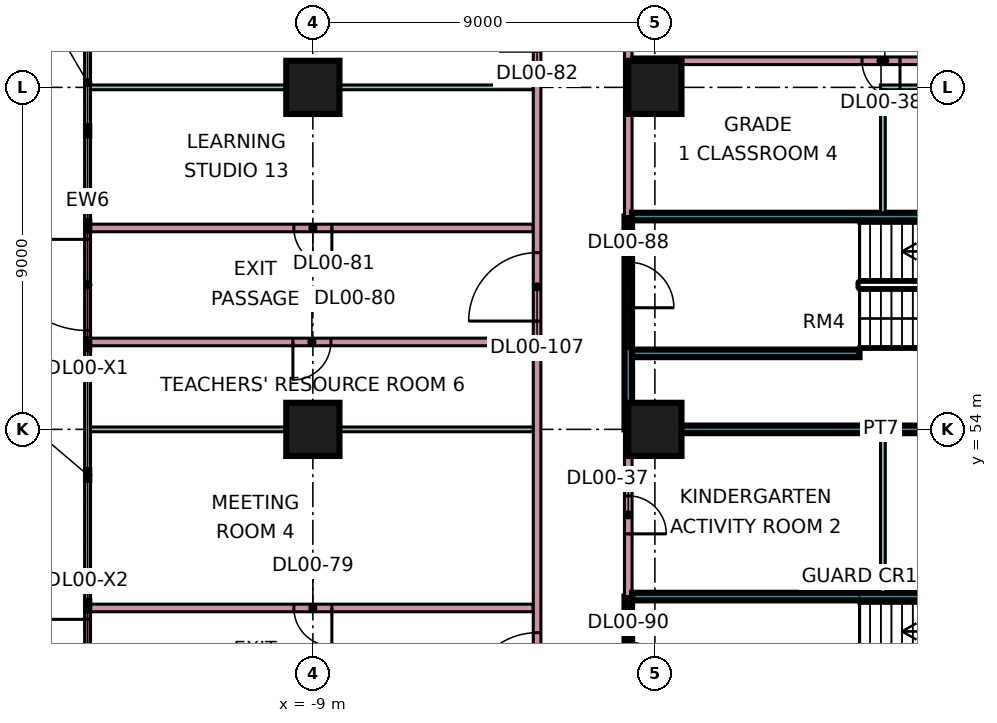
"""IFC4 building model, lengths in metres.
Left out: names, types, materials, properties, quantities, classifications, styles, units other than length and angle.
Written with IfcOpenShell. Run it as: python <this file> out.ifc"""

import sys

from ifc_helpers import new_model, si_unit, direction, frame, frame_2d, origin, origin_2d, place, context, subcontext, project, spatial, rectangle, extrude, element, fill, save


model = new_model("IFC4")
c1 = context("Model", 3, precision=1e-05, world=origin(), true_north=direction((0.0, 1.0)))
c2 = subcontext(c1, "Body", "Model", "MODEL_VIEW")
j1 = project(units=[si_unit("LENGTHUNIT", "METRE"), si_unit("PLANEANGLEUNIT", "RADIAN")], contexts=[c1])
p1 = place(None, origin())
s1 = spatial("IfcSite", under=j1, at=p1, CompositionType="ELEMENT")
p2 = place(p1, origin())
s2 = spatial("IfcBuilding", under=s1, at=p2, CompositionType="ELEMENT")
p3 = place(p2, origin())
s3 = spatial("IfcBuildingStorey", under=s2, at=p3, CompositionType="ELEMENT", Elevation=0.0)
for number, where, z_axis, x_axis in (
    (1, (-9.0, 54.0, 0.0), (0.0, 0.0, 1.0), (1.0, 0.0, 0.0)),
    (2, (0.0, 54.0, 0.0), (0.0, 0.0, 1.0), (1.0, 0.0, 0.0)),
    (3, (-9.0, 63.0, 0.0), (0.0, 0.0, 1.0), (1.0, 0.0, 0.0)),
    (4, (0.0, 63.0, 0.0), (0.0, 0.0, 1.0), (1.0, 0.0, 0.0)),
):
    element("IfcColumn", number, at=place(p3, frame(where, z_axis=z_axis, x_axis=x_axis)), inside=s3, PredefinedType="COLUMN", context=c2, shape_type="SweptSolid", body=[
        extrude(rectangle(XDim=1.4, YDim=1.4, at=origin_2d()), origin(), (0.0, 0.0, 1.0), 7.2),
    ])
p4 = place(p3, frame((-14.925, 59.3, 0.0), z_axis=(0.0, 0.0, 1.0), x_axis=(0.0, -1.0, 0.0)))
e5 = element("IfcWall", 5, at=p4, inside=s3, PredefinedType="SOLIDWALL", context=c2, shape_type="SweptSolid", body=[
    extrude(rectangle(XDim=3.0, YDim=0.15, at=frame_2d((1.5, 0.0))), origin(), (0.0, 0.0, 1.0), 6.8),
])
p5 = place(p4, frame((0.3, 0.0, 0.0)))
e6 = element("IfcOpeningElement", 6, at=p5, cuts=e5, PredefinedType="OPENING", context=c2, shape_type="SweptSolid", body=[
    extrude(rectangle(XDim=2.4, YDim=2.4, at=frame_2d((1.2, 1.2))), frame((0.0, 0.085, 0.0), z_axis=(0.0, -1.0, 0.0), x_axis=(1.0, 0.0, 0.0)), (0.0, 0.0, 1.0), 0.17),
])
p6 = place(p3, frame((-14.925, 49.3, 0.0), z_axis=(0.0, 0.0, 1.0), x_axis=(0.0, -1.0, 0.0)))
e7 = element("IfcWall", 7, at=p6, inside=s3, PredefinedType="SOLIDWALL", context=c2, shape_type="SweptSolid", body=[
    extrude(rectangle(XDim=3.0, YDim=0.15, at=frame_2d((1.5, 0.0))), origin(), (0.0, 0.0, 1.0), 6.8),
])
p7 = place(p6, frame((0.3, 0.0, 0.0)))
e8 = element("IfcOpeningElement", 8, at=p7, cuts=e7, PredefinedType="OPENING", context=c2, shape_type="SweptSolid", body=[
    extrude(rectangle(XDim=2.4, YDim=2.4, at=frame_2d((1.2, 1.2))), frame((0.0, 0.085, 0.0), z_axis=(0.0, -1.0, 0.0), x_axis=(1.0, 0.0, 0.0)), (0.0, 0.0, 1.0), 0.17),
])
p8 = place(p3, frame((-14.925, 49.3, 0.0), z_axis=(0.0, 0.0, 1.0), x_axis=(1.0, 0.0, 0.0)))
e9 = element("IfcWall", 9, at=p8, inside=s3, PredefinedType="PARTITIONING", context=c2, shape_type="SweptSolid", body=[
    extrude(rectangle(XDim=11.725, YDim=0.2, at=frame_2d((5.863, 0.0))), origin(), (0.0, 0.0, 1.0), 6.8),
])
p9 = place(p8, frame((5.425, 0.0, 0.0)))
e10 = element("IfcOpeningElement", 10, at=p9, cuts=e9, PredefinedType="OPENING", context=c2, shape_type="SweptSolid", body=[
    extrude(rectangle(XDim=1.0, YDim=2.1, at=frame_2d((0.5, 1.05))), frame((0.0, 0.11, 0.0), z_axis=(0.0, -1.0, 0.0), x_axis=(1.0, 0.0, 0.0)), (0.0, 0.0, 1.0), 0.22),
])
p10 = place(p3, frame((-14.925, 54.0, 0.0), z_axis=(0.0, 0.0, 1.0), x_axis=(1.0, 0.0, 0.0)))
e11 = element("IfcWall", 11, at=p10, inside=s3, PredefinedType="PARTITIONING", context=c2, shape_type="SweptSolid", body=[
    extrude(rectangle(XDim=11.725, YDim=0.125, at=frame_2d((5.863, 0.0))), origin(), (0.0, 0.0, 1.0), 6.8),
])
p11 = place(p3, frame((-14.925, 56.3, 0.0), z_axis=(0.0, 0.0, 1.0), x_axis=(1.0, 0.0, 0.0)))
e12 = element("IfcWall", 12, at=p11, inside=s3, PredefinedType="PARTITIONING", context=c2, shape_type="SweptSolid", body=[
    extrude(rectangle(XDim=11.725, YDim=0.2, at=frame_2d((5.863, 0.0))), origin(), (0.0, 0.0, 1.0), 6.8),
])
p12 = place(p11, frame((5.4, 0.0, 0.0)))
e13 = element("IfcOpeningElement", 13, at=p12, cuts=e12, PredefinedType="OPENING", context=c2, shape_type="SweptSolid", body=[
    extrude(rectangle(XDim=1.0, YDim=2.1, at=frame_2d((0.5, 1.05))), frame((0.0, 0.11, 0.0), z_axis=(0.0, -1.0, 0.0), x_axis=(1.0, 0.0, 0.0)), (0.0, 0.0, 1.0), 0.22),
])
p13 = place(p3, frame((-14.925, 59.3, 0.0), z_axis=(0.0, 0.0, 1.0), x_axis=(1.0, 0.0, 0.0)))
e14 = element("IfcWall", 14, at=p13, inside=s3, PredefinedType="PARTITIONING", context=c2, shape_type="SweptSolid", body=[
    extrude(rectangle(XDim=11.725, YDim=0.2, at=frame_2d((5.863, 0.0))), origin(), (0.0, 0.0, 1.0), 6.8),
])
p14 = place(p13, frame((5.425, 0.0, 0.0)))
e15 = element("IfcOpeningElement", 15, at=p14, cuts=e14, PredefinedType="OPENING", context=c2, shape_type="SweptSolid", body=[
    extrude(rectangle(XDim=1.0, YDim=2.1, at=frame_2d((0.5, 1.05))), frame((0.0, 0.11, 0.0), z_axis=(0.0, -1.0, 0.0), x_axis=(1.0, 0.0, 0.0)), (0.0, 0.0, 1.0), 0.22),
])
p15 = place(p3, frame((-14.925, 63.0, 0.0), z_axis=(0.0, 0.0, 1.0), x_axis=(1.0, 0.0, 0.0)))
e16 = element("IfcWall", 16, at=p15, inside=s3, PredefinedType="PARTITIONING", context=c2, shape_type="SweptSolid", body=[
    extrude(rectangle(XDim=11.725, YDim=0.125, at=frame_2d((5.863, 0.0))), origin(), (0.0, 0.0, 1.0), 6.8),
])
p16 = place(p3, frame((-3.1, -3.0, 0.0), z_axis=(0.0, 0.0, 1.0), x_axis=(0.0, 1.0, 0.0)))
e17 = element("IfcWall", 17, at=p16, inside=s3, PredefinedType="PARTITIONING", context=c2, shape_type="SweptSolid", body=[
    extrude(rectangle(XDim=69.1, YDim=0.2, at=frame_2d((34.55, 0.0))), origin(), (0.0, 0.0, 1.0), 6.8),
])
p17 = place(p16, frame((8.6, 0.0, 0.0)))
e18 = element("IfcOpeningElement", 18, at=p17, cuts=e17, PredefinedType="OPENING", context=c2, shape_type="SweptSolid", body=[
    extrude(rectangle(XDim=1.0, YDim=2.1, at=frame_2d((0.5, 1.05))), frame((0.0, 0.11, 0.0), z_axis=(0.0, -1.0, 0.0), x_axis=(1.0, 0.0, 0.0)), (0.0, 0.0, 1.0), 0.22),
])
p18 = place(p16, frame((13.85, 0.0, 0.0)))
e19 = element("IfcOpeningElement", 19, at=p18, cuts=e17, PredefinedType="OPENING", context=c2, shape_type="SweptSolid", body=[
    extrude(rectangle(XDim=1.0, YDim=2.1, at=frame_2d((0.5, 1.05))), frame((0.0, 0.11, 0.0), z_axis=(0.0, -1.0, 0.0), x_axis=(1.0, 0.0, 0.0)), (0.0, 0.0, 1.0), 0.22),
])
p19 = place(p16, frame((18.6, 0.0, 0.0)))
e20 = element("IfcOpeningElement", 20, at=p19, cuts=e17, PredefinedType="OPENING", context=c2, shape_type="SweptSolid", body=[
    extrude(rectangle(XDim=1.0, YDim=2.1, at=frame_2d((0.5, 1.05))), frame((0.0, 0.11, 0.0), z_axis=(0.0, -1.0, 0.0), x_axis=(1.0, 0.0, 0.0)), (0.0, 0.0, 1.0), 0.22),
])
p20 = place(p16, frame((66.95, 0.0, 0.0)))
e21 = element("IfcOpeningElement", 21, at=p20, cuts=e17, PredefinedType="OPENING", context=c2, shape_type="SweptSolid", body=[
    extrude(rectangle(XDim=1.0, YDim=2.1, at=frame_2d((0.5, 1.05))), frame((0.0, 0.11, 0.0), z_axis=(0.0, -1.0, 0.0), x_axis=(1.0, 0.0, 0.0)), (0.0, 0.0, 1.0), 0.22),
])
p21 = place(p16, frame((59.85, 0.0, 0.0)))
e22 = element("IfcOpeningElement", 22, at=p21, cuts=e17, PredefinedType="OPENING", context=c2, shape_type="SweptSolid", body=[
    extrude(rectangle(XDim=1.8, YDim=2.1, at=frame_2d((0.9, 1.05))), frame((0.0, 0.11, 0.0), z_axis=(0.0, -1.0, 0.0), x_axis=(1.0, 0.0, 0.0)), (0.0, 0.0, 1.0), 0.22),
])
p22 = place(p16, frame((49.85, 0.0, 0.0)))
e23 = element("IfcOpeningElement", 23, at=p22, cuts=e17, PredefinedType="OPENING", context=c2, shape_type="SweptSolid", body=[
    extrude(rectangle(XDim=1.8, YDim=2.1, at=frame_2d((0.9, 1.05))), frame((0.0, 0.11, 0.0), z_axis=(0.0, -1.0, 0.0), x_axis=(1.0, 0.0, 0.0)), (0.0, 0.0, 1.0), 0.22),
])
p23 = place(p16, frame((29.85, 0.0, 0.0)))
e24 = element("IfcOpeningElement", 24, at=p23, cuts=e17, PredefinedType="OPENING", context=c2, shape_type="SweptSolid", body=[
    extrude(rectangle(XDim=1.8, YDim=2.1, at=frame_2d((0.9, 1.05))), frame((0.0, 0.11, 0.0), z_axis=(0.0, -1.0, 0.0), x_axis=(1.0, 0.0, 0.0)), (0.0, 0.0, 1.0), 0.22),
])
p24 = place(p16, frame((39.6, 0.0, 0.0)))
e25 = element("IfcOpeningElement", 25, at=p24, cuts=e17, PredefinedType="OPENING", context=c2, shape_type="SweptSolid", body=[
    extrude(rectangle(XDim=1.8, YDim=2.1, at=frame_2d((0.9, 1.05))), frame((0.0, 0.11, 0.0), z_axis=(0.0, -1.0, 0.0), x_axis=(1.0, 0.0, 0.0)), (0.0, 0.0, 1.0), 0.22),
])
p25 = place(p16, frame((23.55, 0.0, 0.0)))
e26 = element("IfcOpeningElement", 26, at=p25, cuts=e17, PredefinedType="OPENING", context=c2, shape_type="SweptSolid", body=[
    extrude(rectangle(XDim=1.8, YDim=2.1, at=frame_2d((0.9, 1.05))), frame((0.0, 0.11, 0.0), z_axis=(0.0, -1.0, 0.0), x_axis=(1.0, 0.0, 0.0)), (0.0, 0.0, 1.0), 0.22),
])
p26 = place(p3, frame((-0.7, 45.0, 0.0), z_axis=(0.0, 0.0, 1.0), x_axis=(0.0, 1.0, 0.0)))
e27 = element("IfcWall", 27, at=p26, inside=s3, PredefinedType="SOLIDWALL", context=c2, shape_type="SweptSolid", body=[
    extrude(rectangle(XDim=4.6, YDim=0.2, at=frame_2d((2.3, 0.0))), origin(), (0.0, 0.0, 1.0), 6.8),
])
p27 = place(p26, frame((2.2, 0.0, 0.0)))
e28 = element("IfcOpeningElement", 28, at=p27, cuts=e27, PredefinedType="OPENING", context=c2, shape_type="SweptSolid", body=[
    extrude(rectangle(XDim=1.2, YDim=2.1, at=frame_2d((0.6, 1.05))), frame((0.0, 0.11, 0.0), z_axis=(0.0, -1.0, 0.0), x_axis=(1.0, 0.0, 0.0)), (0.0, 0.0, 1.0), 0.22),
])
p28 = place(p3, frame((-0.7, 49.6, 0.0), z_axis=(0.0, 0.0, 1.0), x_axis=(0.0, 1.0, 0.0)))
e29 = element("IfcWall", 29, at=p28, inside=s3, PredefinedType="PARTITIONING", context=c2, shape_type="SweptSolid", body=[
    extrude(rectangle(XDim=4.4, YDim=0.2, at=frame_2d((2.2, 0.0))), origin(), (0.0, 0.0, 1.0), 6.8),
])
p29 = place(p28, frame((1.65, 0.0, 0.0)))
e30 = element("IfcOpeningElement", 30, at=p29, cuts=e29, PredefinedType="OPENING", context=c2, shape_type="SweptSolid", body=[
    extrude(rectangle(XDim=1.0, YDim=2.1, at=frame_2d((0.5, 1.05))), frame((0.0, 0.11, 0.0), z_axis=(0.0, -1.0, 0.0), x_axis=(1.0, 0.0, 0.0)), (0.0, 0.0, 1.0), 0.22),
])
p30 = place(p3, frame((-0.7, 54.0, 0.0), z_axis=(0.0, 0.0, 1.0), x_axis=(0.0, 1.0, 0.0)))
e31 = element("IfcWall", 31, at=p30, inside=s3, PredefinedType="SOLIDWALL", context=c2, shape_type="SweptSolid", body=[
    extrude(rectangle(XDim=5.6, YDim=0.2, at=frame_2d((2.8, 0.0))), origin(), (0.0, 0.0, 1.0), 6.8),
])
p31 = place(p30, frame((3.2, 0.0, 0.0)))
e32 = element("IfcOpeningElement", 32, at=p31, cuts=e31, PredefinedType="OPENING", context=c2, shape_type="SweptSolid", body=[
    extrude(rectangle(XDim=1.2, YDim=2.1, at=frame_2d((0.6, 1.05))), frame((0.0, 0.11, 0.0), z_axis=(0.0, -1.0, 0.0), x_axis=(1.0, 0.0, 0.0)), (0.0, 0.0, 1.0), 0.22),
])
p32 = place(p3, frame((-0.7, 59.6, 0.0), z_axis=(0.0, 0.0, 1.0), x_axis=(0.0, 1.0, 0.0)))
e33 = element("IfcWall", 33, at=p32, inside=s3, PredefinedType="PARTITIONING", context=c2, shape_type="SweptSolid", body=[
    extrude(rectangle(XDim=6.4, YDim=0.2, at=frame_2d((3.2, 0.0))), origin(), (0.0, 0.0, 1.0), 6.8),
])
for number, where, z_axis, x_axis in (
    (34, (-0.6, 49.6, 0.0), (0.0, 0.0, 1.0), (1.0, 0.0, 0.0)),
    (35, (-0.6, 54.0, 0.0), (0.0, 0.0, 1.0), (1.0, 0.0, 0.0)),
    (36, (-0.6, 59.6, 0.0), (0.0, 0.0, 1.0), (1.0, 0.0, 0.0)),
):
    element("IfcWall", number, at=place(p3, frame(where, z_axis=z_axis, x_axis=x_axis)), inside=s3, PredefinedType="SOLIDWALL", context=c2, shape_type="SweptSolid", body=[
        extrude(rectangle(XDim=13.1, YDim=0.2, at=frame_2d((6.55, 0.0))), origin(), (0.0, 0.0, 1.0), 6.8),
    ])
p33 = place(p3, frame((-0.6, 63.7, 0.0), z_axis=(0.0, 0.0, 1.0), x_axis=(1.0, 0.0, 0.0)))
e37 = element("IfcWall", 37, at=p33, inside=s3, PredefinedType="PARTITIONING", context=c2, shape_type="SweptSolid", body=[
    extrude(rectangle(XDim=13.3, YDim=0.2, at=frame_2d((6.65, 0.0))), origin(), (0.0, 0.0, 1.0), 6.8),
])
p34 = place(p33, frame((6.05, 0.0, 0.0)))
e38 = element("IfcOpeningElement", 38, at=p34, cuts=e37, PredefinedType="OPENING", context=c2, shape_type="SweptSolid", body=[
    extrude(rectangle(XDim=1.0, YDim=2.1, at=frame_2d((0.5, 1.05))), frame((0.0, 0.11, 0.0), z_axis=(0.0, -1.0, 0.0), x_axis=(1.0, 0.0, 0.0)), (0.0, 0.0, 1.0), 0.22),
])
p35 = place(p3, frame((5.938, 63.0, 0.0), z_axis=(0.0, 0.0, 1.0), x_axis=(1.0, 0.0, 0.0)))
e39 = element("IfcWall", 39, at=p35, inside=s3, PredefinedType="PARTITIONING", context=c2, shape_type="SweptSolid", body=[
    extrude(rectangle(XDim=6.562, YDim=0.125, at=frame_2d((3.281, 0.0))), origin(), (0.0, 0.0, 1.0), 6.8),
])
p36 = place(p3, frame((6.0, 49.7, 0.0), z_axis=(0.0, 0.0, 1.0), x_axis=(0.0, 1.0, 0.0)))
e40 = element("IfcWall", 40, at=p36, inside=s3, PredefinedType="PARTITIONING", context=c2, shape_type="SweptSolid", body=[
    extrude(rectangle(XDim=4.2, YDim=0.125, at=frame_2d((2.1, 0.0))), origin(), (0.0, 0.0, 1.0), 6.8),
])
p37 = place(p3, frame((6.0, 59.7, 0.0), z_axis=(0.0, 0.0, 1.0), x_axis=(0.0, 1.0, 0.0)))
e41 = element("IfcWall", 41, at=p37, inside=s3, PredefinedType="PARTITIONING", context=c2, shape_type="SweptSolid", body=[
    extrude(rectangle(XDim=3.238, YDim=0.125, at=frame_2d((1.619, 0.0))), origin(), (0.0, 0.0, 1.0), 6.8),
])
p38 = place(p3, frame((-0.6, 56.0, 0.0), z_axis=(0.0, 0.0, 1.0), x_axis=(1.0, 0.0, 0.0)))
e42 = element("IfcWall", 42, at=p38, inside=s3, PredefinedType="SOLIDWALL", context=c2, shape_type="SweptSolid", body=[
    extrude(rectangle(XDim=5.985, YDim=0.2, at=frame_2d((2.993, 0.0))), origin(), (0.0, 0.0, 1.0), 6.8),
])
p39 = place(p5, frame((2.4, 0.0, 0.0), z_axis=(0.0, 0.0, 1.0), x_axis=(-1.0, 0.0, 0.0)))
e43 = element("IfcDoor", 43, at=p39, inside=s3, OperationType="DOUBLE_DOOR_SINGLE_SWING", PredefinedType="DOOR", context=c2, shape_type="SweptSolid", body=[
    extrude(rectangle(XDim=2.4, YDim=2.4, at=frame_2d((1.2, 1.2))), frame((0.0, 0.025, 0.0), z_axis=(0.0, -1.0, 0.0), x_axis=(1.0, 0.0, 0.0)), (0.0, 0.0, 1.0), 0.05),
])
fill(e6, e43)
p40 = place(p7, frame((2.4, 0.0, 0.0), z_axis=(0.0, 0.0, 1.0), x_axis=(-1.0, 0.0, 0.0)))
e44 = element("IfcDoor", 44, at=p40, inside=s3, OperationType="DOUBLE_DOOR_SINGLE_SWING", PredefinedType="DOOR", context=c2, shape_type="SweptSolid", body=[
    extrude(rectangle(XDim=2.4, YDim=2.4, at=frame_2d((1.2, 1.2))), frame((0.0, 0.025, 0.0), z_axis=(0.0, -1.0, 0.0), x_axis=(1.0, 0.0, 0.0)), (0.0, 0.0, 1.0), 0.05),
])
fill(e8, e44)
p41 = place(p29, frame((1.0, 0.0, 0.0), z_axis=(0.0, 0.0, 1.0), x_axis=(-1.0, 0.0, 0.0)))
e45 = element("IfcDoor", 45, at=p41, inside=s3, OperationType="SINGLE_SWING_LEFT", PredefinedType="DOOR", context=c2, shape_type="SweptSolid", body=[
    extrude(rectangle(XDim=1.0, YDim=2.1, at=frame_2d((0.5, 1.05))), frame((0.0, 0.025, 0.0), z_axis=(0.0, -1.0, 0.0), x_axis=(1.0, 0.0, 0.0)), (0.0, 0.0, 1.0), 0.05),
])
fill(e30, e45)
p42 = place(p34, origin())
e46 = element("IfcDoor", 46, at=p42, inside=s3, OperationType="SINGLE_SWING_RIGHT", PredefinedType="DOOR", context=c2, shape_type="SweptSolid", body=[
    extrude(rectangle(XDim=1.0, YDim=2.1, at=frame_2d((0.5, 1.05))), frame((0.0, 0.025, 0.0), z_axis=(0.0, -1.0, 0.0), x_axis=(1.0, 0.0, 0.0)), (0.0, 0.0, 1.0), 0.05),
])
fill(e38, e46)
p43 = place(p9, origin())
e47 = element("IfcDoor", 47, at=p43, inside=s3, OperationType="SINGLE_SWING_RIGHT", PredefinedType="DOOR", context=c2, shape_type="SweptSolid", body=[
    extrude(rectangle(XDim=1.0, YDim=2.1, at=frame_2d((0.5, 1.05))), frame((0.0, 0.025, 0.0), z_axis=(0.0, -1.0, 0.0), x_axis=(1.0, 0.0, 0.0)), (0.0, 0.0, 1.0), 0.05),
])
fill(e10, e47)
p44 = place(p12, frame((1.0, 0.0, 0.0), z_axis=(0.0, 0.0, 1.0), x_axis=(-1.0, 0.0, 0.0)))
e48 = element("IfcDoor", 48, at=p44, inside=s3, OperationType="SINGLE_SWING_LEFT", PredefinedType="DOOR", context=c2, shape_type="SweptSolid", body=[
    extrude(rectangle(XDim=1.0, YDim=2.1, at=frame_2d((0.5, 1.05))), frame((0.0, 0.025, 0.0), z_axis=(0.0, -1.0, 0.0), x_axis=(1.0, 0.0, 0.0)), (0.0, 0.0, 1.0), 0.05),
])
fill(e13, e48)
p45 = place(p14, origin())
e49 = element("IfcDoor", 49, at=p45, inside=s3, OperationType="SINGLE_SWING_RIGHT", PredefinedType="DOOR", context=c2, shape_type="SweptSolid", body=[
    extrude(rectangle(XDim=1.0, YDim=2.1, at=frame_2d((0.5, 1.05))), frame((0.0, 0.025, 0.0), z_axis=(0.0, -1.0, 0.0), x_axis=(1.0, 0.0, 0.0)), (0.0, 0.0, 1.0), 0.05),
])
fill(e15, e49)
p46 = place(p31, frame((1.2, 0.0, 0.0), z_axis=(0.0, 0.0, 1.0), x_axis=(-1.0, 0.0, 0.0)))
e50 = element("IfcDoor", 50, at=p46, inside=s3, OperationType="SINGLE_SWING_LEFT", PredefinedType="DOOR", context=c2, shape_type="SweptSolid", body=[
    extrude(rectangle(XDim=1.2, YDim=2.1, at=frame_2d((0.6, 1.05))), frame((0.0, 0.025, 0.0), z_axis=(0.0, -1.0, 0.0), x_axis=(1.0, 0.0, 0.0)), (0.0, 0.0, 1.0), 0.05),
])
fill(e32, e50)
p47 = place(p27, frame((1.2, 0.0, 0.0), z_axis=(0.0, 0.0, 1.0), x_axis=(-1.0, 0.0, 0.0)))
e51 = element("IfcDoor", 51, at=p47, inside=s3, OperationType="SINGLE_SWING_LEFT", PredefinedType="DOOR", context=c2, shape_type="SweptSolid", body=[
    extrude(rectangle(XDim=1.2, YDim=2.1, at=frame_2d((0.6, 1.05))), frame((0.0, 0.025, 0.0), z_axis=(0.0, -1.0, 0.0), x_axis=(1.0, 0.0, 0.0)), (0.0, 0.0, 1.0), 0.05),
])
fill(e28, e51)
p48 = place(p21, origin())
e52 = element("IfcDoor", 52, at=p48, inside=s3, OperationType="DOUBLE_DOOR_SINGLE_SWING", PredefinedType="DOOR", context=c2, shape_type="SweptSolid", body=[
    extrude(rectangle(XDim=1.8, YDim=2.1, at=frame_2d((0.9, 1.05))), frame((0.0, 0.025, 0.0), z_axis=(0.0, -1.0, 0.0), x_axis=(1.0, 0.0, 0.0)), (0.0, 0.0, 1.0), 0.05),
])
fill(e22, e52)
p49 = place(p22, origin())
e53 = element("IfcDoor", 53, at=p49, inside=s3, OperationType="DOUBLE_DOOR_SINGLE_SWING", PredefinedType="DOOR", context=c2, shape_type="SweptSolid", body=[
    extrude(rectangle(XDim=1.8, YDim=2.1, at=frame_2d((0.9, 1.05))), frame((0.0, 0.025, 0.0), z_axis=(0.0, -1.0, 0.0), x_axis=(1.0, 0.0, 0.0)), (0.0, 0.0, 1.0), 0.05),
])
fill(e23, e53)
save(model, sys.argv[1])
